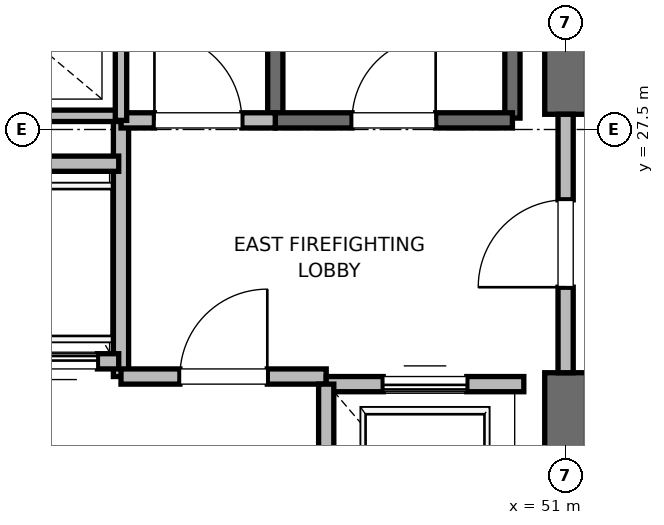
"""IFC4 building model, lengths in metres.
Left out: names, types, materials, properties, quantities, classifications, styles, units other than length and angle.
Written with IfcOpenShell. Run it as: python <this file> out.ifc"""

import sys

from ifc_helpers import new_model, si_unit, direction, frame, frame_2d, origin, place, context, subcontext, project, spatial, rectangle, extrude, element, fill, save


model = new_model("IFC4")
c1 = context("Model", 3, precision=1e-05, world=origin(), true_north=direction((0.0, 1.0)))
c2 = subcontext(c1, "Body", "Model", "MODEL_VIEW")
j1 = project(units=[si_unit("LENGTHUNIT", "METRE"), si_unit("PLANEANGLEUNIT", "RADIAN")], contexts=[c1])
p1 = place(None, origin())
s1 = spatial("IfcSite", under=j1, at=p1, CompositionType="ELEMENT")
p2 = place(p1, origin())
s2 = spatial("IfcBuilding", under=s1, at=p2, CompositionType="ELEMENT")
p3 = place(p2, frame((0.0, 0.0, 184.4)))
s3 = spatial("IfcBuildingStorey", under=s2, at=p3, CompositionType="ELEMENT", Elevation=184.4)
p4 = place(p3, frame((51.0, 18.5, 0.0), z_axis=(0.0, 0.0, 1.0), x_axis=(0.0, 1.0, 0.0)))
e1 = element("IfcWall", 1, at=p4, inside=s3, PredefinedType="SHEAR", context=c2, shape_type="SweptSolid", body=[
    extrude(rectangle(XDim=5.8, YDim=0.55, at=frame_2d((2.9, 0.0))), origin(), (0.0, 0.0, 1.0), 4.7),
])
p5 = place(p3, frame((51.0, 27.7, 0.0), z_axis=(0.0, 0.0, 1.0), x_axis=(0.0, 1.0, 0.0)))
e2 = element("IfcWall", 2, at=p5, inside=s3, PredefinedType="SHEAR", context=c2, shape_type="SweptSolid", body=[
    extrude(rectangle(XDim=8.8, YDim=0.55, at=frame_2d((4.4, 0.0))), origin(), (0.0, 0.0, 1.0), 4.7),
])
p6 = place(p3, frame((50.3, 27.65, 0.0), z_axis=(0.0, 0.0, 1.0), x_axis=(0.0, 1.0, 0.0)))
e3 = element("IfcWall", 3, at=p6, inside=s3, PredefinedType="SOLIDWALL", context=c2, shape_type="SweptSolid", body=[
    extrude(rectangle(XDim=8.15, YDim=0.2, at=frame_2d((4.075, 0.0))), origin(), (0.0, 0.0, 1.0), 4.7),
])
p7 = place(p3, frame((47.18, 27.62, 0.0), z_axis=(0.0, 0.0, 1.0), x_axis=(0.0, 1.0, 0.0)))
e4 = element("IfcWall", 4, at=p7, inside=s3, PredefinedType="SOLIDWALL", context=c2, shape_type="SweptSolid", body=[
    extrude(rectangle(XDim=8.18, YDim=0.2, at=frame_2d((4.09, 0.0))), origin(), (0.0, 0.0, 1.0), 4.7),
])
p8 = place(p3, frame((47.18, 27.62, 0.0), z_axis=(0.0, 0.0, 1.0), x_axis=(1.0, 0.0, 0.0)))
e5 = element("IfcWall", 5, at=p8, inside=s3, PredefinedType="SOLIDWALL", context=c2, shape_type="SweptSolid", body=[
    extrude(rectangle(XDim=3.12, YDim=0.2, at=frame_2d((1.56, 0.0))), origin(), (0.0, 0.0, 1.0), 4.7),
])
p9 = place(p8, frame((1.01, 0.0, 0.0)))
e6 = element("IfcOpeningElement", 6, at=p9, cuts=e5, PredefinedType="OPENING", context=c2, shape_type="SweptSolid", body=[
    extrude(rectangle(XDim=1.1, YDim=2.15, at=frame_2d((0.55, 1.075))), frame((0.0, 0.1, 0.0), z_axis=(0.0, -1.0, 0.0), x_axis=(1.0, 0.0, 0.0)), (0.0, 0.0, 1.0), 0.2),
])
p10 = place(p3, frame((45.15, 24.25, 0.0), z_axis=(0.0, 0.0, 1.0), x_axis=(0.0, 1.0, 0.0)))
e7 = element("IfcWall", 7, at=p10, inside=s3, PredefinedType="PARTITIONING", context=c2, shape_type="SweptSolid", body=[
    extrude(rectangle(XDim=3.37, YDim=0.2, at=frame_2d((1.685, 0.0))), origin(), (0.0, 0.0, 1.0), 4.7),
])
p11 = place(p3, frame((45.15, 24.25, 0.0), z_axis=(0.0, 0.0, 1.0), x_axis=(1.0, 0.0, 0.0)))
e8 = element("IfcWall", 8, at=p11, inside=s3, PredefinedType="PARTITIONING", context=c2, shape_type="SweptSolid", body=[
    extrude(rectangle(XDim=2.7, YDim=0.2, at=frame_2d((1.35, 0.0))), origin(), (0.0, 0.0, 1.0), 4.7),
])
p12 = place(p11, frame((0.775, 0.0, 0.0)))
e9 = element("IfcOpeningElement", 9, at=p12, cuts=e8, PredefinedType="OPENING", context=c2, shape_type="SweptSolid", body=[
    extrude(rectangle(XDim=1.15, YDim=2.2, at=frame_2d((0.575, 1.1))), frame((0.0, 0.1, 0.0), z_axis=(0.0, -1.0, 0.0), x_axis=(1.0, 0.0, 0.0)), (0.0, 0.0, 1.0), 0.2),
])
p13 = place(p3, frame((45.15, 27.62, 0.0), z_axis=(0.0, 0.0, 1.0), x_axis=(1.0, 0.0, 0.0)))
e10 = element("IfcWall", 10, at=p13, inside=s3, PredefinedType="PARTITIONING", context=c2, shape_type="SweptSolid", body=[
    extrude(rectangle(XDim=2.03, YDim=0.2, at=frame_2d((1.015, 0.0))), origin(), (0.0, 0.0, 1.0), 4.7),
])
p14 = place(p13, frame((0.44, 0.0, 0.0)))
e11 = element("IfcOpeningElement", 11, at=p14, cuts=e10, PredefinedType="OPENING", context=c2, shape_type="SweptSolid", body=[
    extrude(rectangle(XDim=1.15, YDim=2.2, at=frame_2d((0.575, 1.1))), frame((0.0, 0.1, 0.0), z_axis=(0.0, -1.0, 0.0), x_axis=(1.0, 0.0, 0.0)), (0.0, 0.0, 1.0), 0.2),
])
p15 = place(p3, frame((51.0, 24.3, 0.0), z_axis=(0.0, 0.0, 1.0), x_axis=(0.0, 1.0, 0.0)))
e12 = element("IfcWall", 12, at=p15, inside=s3, PredefinedType="PARTITIONING", context=c2, shape_type="SweptSolid", body=[
    extrude(rectangle(XDim=3.4, YDim=0.2, at=frame_2d((1.7, 0.0))), origin(), (0.0, 0.0, 1.0), 3.68),
])
p16 = place(p15, frame((1.125, 0.0, 0.0)))
e13 = element("IfcOpeningElement", 13, at=p16, cuts=e12, PredefinedType="OPENING", context=c2, shape_type="SweptSolid", body=[
    extrude(rectangle(XDim=1.15, YDim=2.2, at=frame_2d((0.575, 1.1))), frame((0.0, 0.1, 0.0), z_axis=(0.0, -1.0, 0.0), x_axis=(1.0, 0.0, 0.0)), (0.0, 0.0, 1.0), 0.2),
])
p17 = place(p3, frame((50.45, 24.15, 0.0), z_axis=(0.0, 0.0, 1.0), x_axis=(-1.0, 0.0, 0.0)))
e14 = element("IfcWall", 14, at=p17, inside=s3, PredefinedType="SOLIDWALL", context=c2, shape_type="SweptSolid", body=[
    extrude(rectangle(XDim=2.6, YDim=0.2, at=frame_2d((1.3, 0.0))), origin(), (0.0, 0.0, 1.0), 3.68),
])
p18 = place(p17, frame((0.75, 0.0, 0.0)))
e15 = element("IfcOpeningElement", 15, at=p18, cuts=e14, PredefinedType="OPENING", context=c2, shape_type="SweptSolid", body=[
    extrude(rectangle(XDim=1.1, YDim=2.2, at=frame_2d((0.55, 1.1))), frame((0.0, 0.1, 0.0), z_axis=(0.0, -1.0, 0.0), x_axis=(1.0, 0.0, 0.0)), (0.0, 0.0, 1.0), 0.2),
])
p19 = place(p3, frame((47.85, 24.15, 0.0), z_axis=(0.0, 0.0, 1.0), x_axis=(0.0, -1.0, 0.0)))
e16 = element("IfcWall", 16, at=p19, inside=s3, PredefinedType="SOLIDWALL", context=c2, shape_type="SweptSolid", body=[
    extrude(rectangle(XDim=3.0, YDim=0.2, at=frame_2d((1.5, 0.0))), origin(), (0.0, 0.0, 1.0), 4.7),
])
p20 = place(p3, frame((43.46, 24.45, 0.0), z_axis=(0.0, 0.0, 1.0), x_axis=(1.0, 0.0, 0.0)))
e17 = element("IfcWall", 17, at=p20, inside=s3, PredefinedType="SOLIDWALL", context=c2, shape_type="SweptSolid", body=[
    extrude(rectangle(XDim=1.66, YDim=0.2, at=frame_2d((0.83, 0.0))), origin(), (0.0, 0.0, 1.0), 4.7),
])
p21 = place(p20, frame((0.28, 0.0, 0.0)))
e18 = element("IfcOpeningElement", 18, at=p21, cuts=e17, PredefinedType="OPENING", context=c2, shape_type="SweptSolid", body=[
    extrude(rectangle(XDim=1.1, YDim=2.2, at=frame_2d((0.55, 1.1))), frame((0.0, 0.1, 0.0), z_axis=(0.0, -1.0, 0.0), x_axis=(1.0, 0.0, 0.0)), (0.0, 0.0, 1.0), 0.2),
])
p22 = place(p3, frame((45.12, 27.05, 0.0), z_axis=(0.0, 0.0, 1.0), x_axis=(-1.0, 0.0, 0.0)))
e19 = element("IfcWall", 19, at=p22, inside=s3, PredefinedType="SOLIDWALL", context=c2, shape_type="SweptSolid", body=[
    extrude(rectangle(XDim=1.66, YDim=0.2, at=frame_2d((0.83, 0.0))), origin(), (0.0, 0.0, 1.0), 4.7),
])
p23 = place(p3, frame((41.56, 27.68, 0.0), z_axis=(0.0, 0.0, 1.0), x_axis=(1.0, 0.0, 0.0)))
e20 = element("IfcWall", 20, at=p23, inside=s3, PredefinedType="PARTITIONING", context=c2, shape_type="SweptSolid", body=[
    extrude(rectangle(XDim=3.59, YDim=0.15, at=frame_2d((1.795, 0.0))), origin(), (0.0, 0.0, 1.0), 2.85),
])
p24 = place(p3, frame((45.15, 27.62, 0.0), z_axis=(0.0, 0.0, 1.0), x_axis=(0.0, 1.0, 0.0)))
e21 = element("IfcWall", 21, at=p24, inside=s3, PredefinedType="PARTITIONING", context=c2, shape_type="SweptSolid", body=[
    extrude(rectangle(XDim=3.1, YDim=0.15, at=frame_2d((1.55, 0.0))), origin(), (0.0, 0.0, 1.0), 2.85),
])
p25 = place(p9, origin())
e22 = element("IfcDoor", 22, at=p25, inside=s3, OperationType="SINGLE_SWING_RIGHT", PredefinedType="DOOR", context=c2, shape_type="SweptSolid", body=[
    extrude(rectangle(XDim=1.1, YDim=2.15, at=frame_2d((0.55, 1.075))), frame((0.0, 0.025, 0.0), z_axis=(0.0, -1.0, 0.0), x_axis=(1.0, 0.0, 0.0)), (0.0, 0.0, 1.0), 0.05),
])
fill(e6, e22)
p26 = place(p12, origin())
e23 = element("IfcDoor", 23, at=p26, inside=s3, OperationType="SINGLE_SWING_RIGHT", PredefinedType="DOOR", context=c2, shape_type="SweptSolid", body=[
    extrude(rectangle(XDim=1.15, YDim=2.2, at=frame_2d((0.575, 1.1))), frame((0.0, 0.025, 0.0), z_axis=(0.0, -1.0, 0.0), x_axis=(1.0, 0.0, 0.0)), (0.0, 0.0, 1.0), 0.05),
])
fill(e9, e23)
p27 = place(p14, origin())
e24 = element("IfcDoor", 24, at=p27, inside=s3, OperationType="SINGLE_SWING_LEFT", PredefinedType="DOOR", context=c2, shape_type="SweptSolid", body=[
    extrude(rectangle(XDim=1.15, YDim=2.2, at=frame_2d((0.575, 1.1))), frame((0.0, 0.025, 0.0), z_axis=(0.0, -1.0, 0.0), x_axis=(1.0, 0.0, 0.0)), (0.0, 0.0, 1.0), 0.05),
])
fill(e11, e24)
p28 = place(p16, origin())
e25 = element("IfcDoor", 25, at=p28, inside=s3, OperationType="SINGLE_SWING_LEFT", PredefinedType="DOOR", context=c2, shape_type="SweptSolid", body=[
    extrude(rectangle(XDim=1.15, YDim=2.2, at=frame_2d((0.575, 1.1))), frame((0.0, 0.025, 0.0), z_axis=(0.0, -1.0, 0.0), x_axis=(1.0, 0.0, 0.0)), (0.0, 0.0, 1.0), 0.05),
])
fill(e13, e25)
p29 = place(p18, origin())
e26 = element("IfcDoor", 26, at=p29, inside=s3, OperationType="SLIDING_TO_RIGHT", PredefinedType="DOOR", context=c2, shape_type="SweptSolid", body=[
    extrude(rectangle(XDim=1.1, YDim=2.2, at=frame_2d((0.55, 1.1))), frame((0.0, 0.025, 0.0), z_axis=(0.0, -1.0, 0.0), x_axis=(1.0, 0.0, 0.0)), (0.0, 0.0, 1.0), 0.05),
])
fill(e15, e26)
p30 = place(p21, origin())
e27 = element("IfcDoor", 27, at=p30, inside=s3, OperationType="SLIDING_TO_RIGHT", PredefinedType="DOOR", context=c2, shape_type="SweptSolid", body=[
    extrude(rectangle(XDim=1.1, YDim=2.2, at=frame_2d((0.55, 1.1))), frame((0.0, 0.025, 0.0), z_axis=(0.0, -1.0, 0.0), x_axis=(1.0, 0.0, 0.0)), (0.0, 0.0, 1.0), 0.05),
])
fill(e18, e27)
save(model, sys.argv[1])
